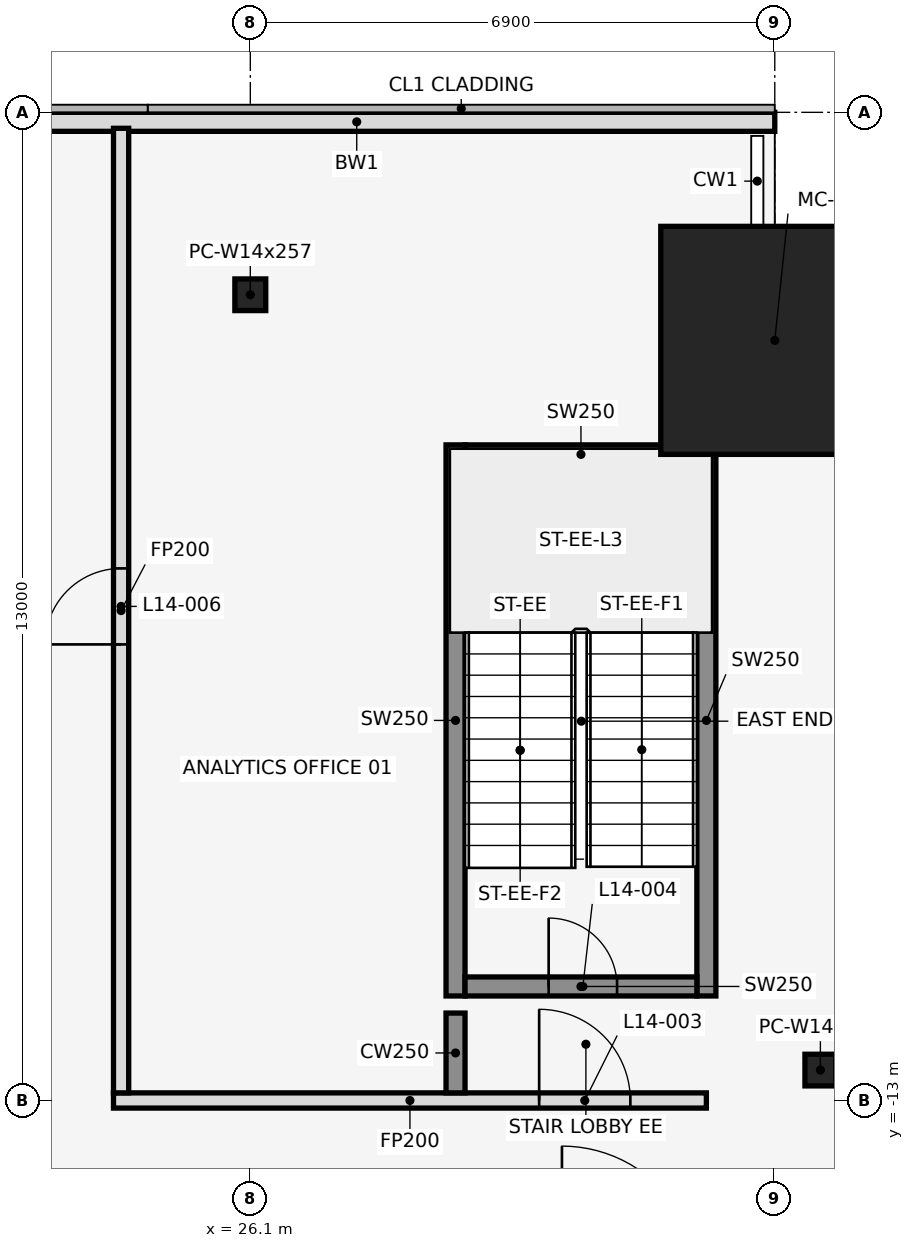
"""IFC4 building model, lengths in metres.
Left out: names, types, materials, properties, quantities, classifications, styles, units other than length and angle.
Written with IfcOpenShell. Run it as: python <this file> out.ifc"""

import sys

from ifc_helpers import new_model, si_unit, direction, frame, frame_2d, origin, origin_2d, place, context, subcontext, project, spatial, rectangle, hollow_rectangle, i_section, extrude, element, fill, save


model = new_model("IFC4")
c1 = context("Model", 3, precision=1e-05, world=origin(), true_north=direction((0.0, 1.0)))
c2 = subcontext(c1, "Body", "Model", "MODEL_VIEW")
j1 = project(units=[si_unit("LENGTHUNIT", "METRE"), si_unit("PLANEANGLEUNIT", "RADIAN")], contexts=[c1])
p1 = place(None, origin())
s1 = spatial("IfcSite", under=j1, at=p1, CompositionType="ELEMENT")
p2 = place(p1, origin())
s2 = spatial("IfcBuilding", under=s1, at=p2, CompositionType="ELEMENT")
p3 = place(p2, frame((0.0, 0.0, 71.0)))
s3 = spatial("IfcBuildingStorey", under=s2, at=p3, CompositionType="ELEMENT", Elevation=71.0)
p4 = place(p3, frame((26.1, -2.4, 0.0), z_axis=(0.0, 0.0, 1.0), x_axis=(1.0, 0.0, 0.0)))
e1 = element("IfcColumn", 1, at=p4, inside=s3, PredefinedType="COLUMN", context=c2, shape_type="SweptSolid", body=[
    extrude(i_section(OverallWidth=0.406, OverallDepth=0.417, WebThickness=0.03, FlangeThickness=0.048, at=origin_2d()), origin(), (0.0, 0.0, 1.0), 4.5),
])
p5 = place(p3, frame((33.0, -3.0, 0.0), z_axis=(0.0, 0.0, 1.0), x_axis=(1.0, 0.0, 0.0)))
e2 = element("IfcColumn", 2, at=p5, inside=s3, PredefinedType="COLUMN", context=c2, shape_type="SweptSolid", body=[
    extrude(hollow_rectangle(XDim=3.0, YDim=3.0, WallThickness=0.1, at=origin_2d()), origin(), (0.0, 0.0, 1.0), 4.5),
])
p6 = place(p3, frame((33.6, -12.6, 0.0), z_axis=(0.0, 0.0, 1.0), x_axis=(1.0, 0.0, 0.0)))
e3 = element("IfcColumn", 3, at=p6, inside=s3, PredefinedType="COLUMN", context=c2, shape_type="SweptSolid", body=[
    extrude(i_section(OverallWidth=0.406, OverallDepth=0.417, WebThickness=0.03, FlangeThickness=0.048, at=origin_2d()), origin(), (0.0, 0.0, 1.0), 4.5),
])
p7 = place(p3, frame((33.0, -0.125, 0.0), z_axis=(0.0, 0.0, 1.0), x_axis=(-1.0, 0.0, 0.0)))
e4 = element("IfcWall", 4, at=p7, inside=s3, PredefinedType="STANDARD", context=c2, shape_type="SweptSolid", body=[
    extrude(rectangle(XDim=11.0, YDim=0.25, at=frame_2d((5.5, 0.0))), origin(), (0.0, 0.0, 1.0), 4.35),
])
for number, where, z_axis, x_axis in (
    (5, (28.8, -11.625, 0.0), (0.0, 0.0, 1.0), (0.0, 1.0, 0.0)),
    (6, (32.1, -11.625, 0.0), (0.0, 0.0, 1.0), (0.0, 1.0, 0.0)),
):
    element("IfcWall", number, at=place(p3, frame(where, z_axis=z_axis, x_axis=x_axis)), inside=s3, PredefinedType="SHEAR", context=c2, shape_type="SweptSolid", body=[
        extrude(rectangle(XDim=7.25, YDim=0.25, at=frame_2d((3.625, 0.0))), origin(), (0.0, 0.0, 1.0), 4.5),
    ])
p8 = place(p3, frame((28.925, -11.5, 0.0), z_axis=(0.0, 0.0, 1.0), x_axis=(1.0, 0.0, 0.0)))
e7 = element("IfcWall", 7, at=p8, inside=s3, PredefinedType="SHEAR", context=c2, shape_type="SweptSolid", body=[
    extrude(rectangle(XDim=3.05, YDim=0.25, at=frame_2d((1.525, 0.0))), origin(), (0.0, 0.0, 1.0), 4.5),
])
p9 = place(p8, frame((1.1, 0.0, 0.0)))
e8 = element("IfcOpeningElement", 8, at=p9, cuts=e7, PredefinedType="OPENING", context=c2, shape_type="SweptSolid", body=[
    extrude(rectangle(XDim=0.9, YDim=2.1, at=frame_2d((0.45, 1.05))), frame((0.0, 0.137, 0.0), z_axis=(0.0, -1.0, 0.0), x_axis=(1.0, 0.0, 0.0)), (0.0, 0.0, 1.0), 0.274),
])
p10 = place(p3, frame((28.925, -4.5, 0.0), z_axis=(0.0, 0.0, 1.0), x_axis=(1.0, 0.0, 0.0)))
e9 = element("IfcWall", 9, at=p10, inside=s3, PredefinedType="SHEAR", context=c2, shape_type="SweptSolid", body=[
    extrude(rectangle(XDim=3.05, YDim=0.25, at=frame_2d((1.525, 0.0))), origin(), (0.0, 0.0, 1.0), 4.5),
])
p11 = place(p3, frame((24.3, -13.0, 0.0), z_axis=(0.0, 0.0, 1.0), x_axis=(1.0, 0.0, 0.0)))
e10 = element("IfcWall", 10, at=p11, inside=s3, PredefinedType="PARTITIONING", context=c2, shape_type="SweptSolid", body=[
    extrude(rectangle(XDim=7.8, YDim=0.2, at=frame_2d((3.9, 0.0))), origin(), (0.0, 0.0, 1.0), 3.418),
])
p12 = place(p11, frame((5.6, 0.0, 0.0)))
e11 = element("IfcOpeningElement", 11, at=p12, cuts=e10, PredefinedType="OPENING", context=c2, shape_type="SweptSolid", body=[
    extrude(rectangle(XDim=1.2, YDim=2.1, at=frame_2d((0.6, 1.05))), frame((0.0, 0.112, 0.0), z_axis=(0.0, -1.0, 0.0), x_axis=(1.0, 0.0, 0.0)), (0.0, 0.0, 1.0), 0.224),
])
p13 = place(p3, frame((24.4, -12.9, 0.0), z_axis=(0.0, 0.0, 1.0), x_axis=(0.0, 1.0, 0.0)))
e12 = element("IfcWall", 12, at=p13, inside=s3, PredefinedType="PARTITIONING", context=c2, shape_type="SweptSolid", body=[
    extrude(rectangle(XDim=12.69, YDim=0.2, at=frame_2d((6.345, 0.0))), origin(), (0.0, 0.0, 1.0), 3.418),
])
p14 = place(p13, frame((5.9, 0.0, 0.0)))
e13 = element("IfcOpeningElement", 13, at=p14, cuts=e12, PredefinedType="OPENING", context=c2, shape_type="SweptSolid", body=[
    extrude(rectangle(XDim=1.0, YDim=2.1, at=frame_2d((0.5, 1.05))), frame((0.0, 0.112, 0.0), z_axis=(0.0, -1.0, 0.0), x_axis=(1.0, 0.0, 0.0)), (0.0, 0.0, 1.0), 0.224),
])
p15 = place(p3, frame((28.8, -12.9, 0.0), z_axis=(0.0, 0.0, 1.0), x_axis=(0.0, 1.0, 0.0)))
e14 = element("IfcWall", 14, at=p15, inside=s3, PredefinedType="SHEAR", context=c2, shape_type="SweptSolid", body=[
    extrude(rectangle(XDim=1.05, YDim=0.25, at=frame_2d((0.525, 0.0))), origin(), (0.0, 0.0, 1.0), 4.5),
])
p16 = place(p12, origin())
e15 = element("IfcDoor", 15, at=p16, inside=s3, OperationType="SINGLE_SWING_RIGHT", PredefinedType="DOOR", context=c2, shape_type="SweptSolid", body=[
    extrude(rectangle(XDim=1.2, YDim=2.1, at=frame_2d((0.6, 1.05))), frame((0.0, 0.025, 0.0), z_axis=(0.0, -1.0, 0.0), x_axis=(1.0, 0.0, 0.0)), (0.0, 0.0, 1.0), 0.05),
])
fill(e11, e15)
p17 = place(p9, origin())
e16 = element("IfcDoor", 16, at=p17, inside=s3, OperationType="SINGLE_SWING_LEFT", PredefinedType="DOOR", context=c2, shape_type="SweptSolid", body=[
    extrude(rectangle(XDim=0.9, YDim=2.1, at=frame_2d((0.45, 1.05))), frame((0.0, 0.025, 0.0), z_axis=(0.0, -1.0, 0.0), x_axis=(1.0, 0.0, 0.0)), (0.0, 0.0, 1.0), 0.05),
])
fill(e8, e16)
p18 = place(p14, frame((1.0, 0.0, 0.0), z_axis=(0.0, 0.0, 1.0), x_axis=(-1.0, 0.0, 0.0)))
e17 = element("IfcDoor", 17, at=p18, inside=s3, OperationType="SINGLE_SWING_RIGHT", PredefinedType="DOOR", context=c2, shape_type="SweptSolid", body=[
    extrude(rectangle(XDim=1.0, YDim=2.1, at=frame_2d((0.5, 1.05))), frame((0.0, 0.025, 0.0), z_axis=(0.0, -1.0, 0.0), x_axis=(1.0, 0.0, 0.0)), (0.0, 0.0, 1.0), 0.05),
])
fill(e13, e17)
save(model, sys.argv[1])
